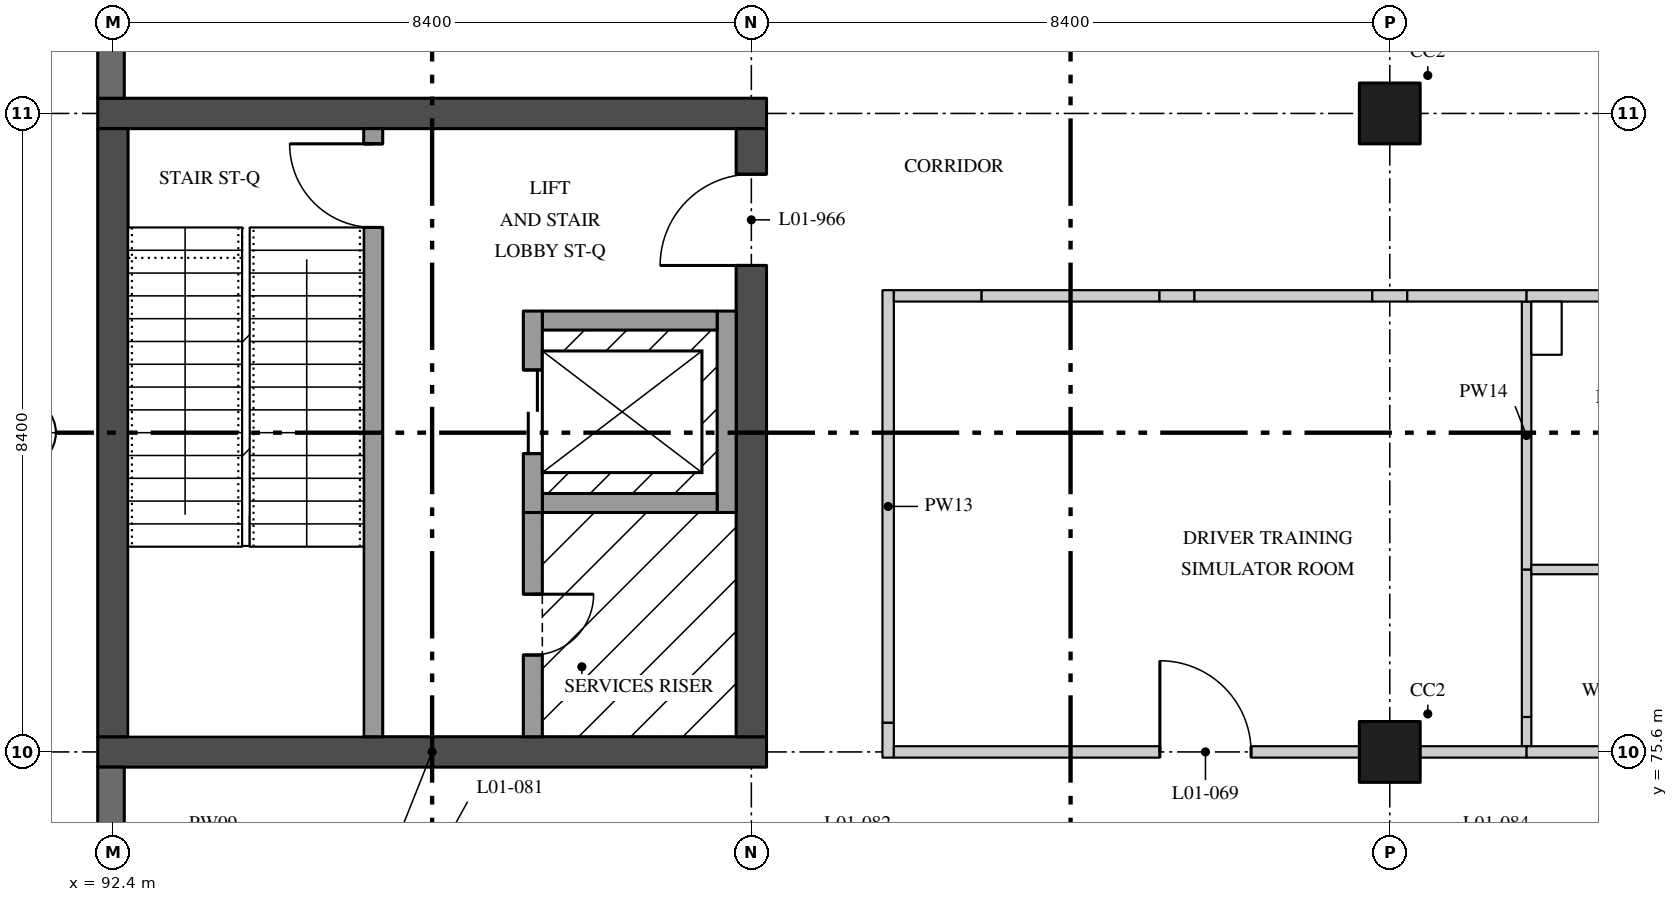
"""IFC4 building model, lengths in metres.
Left out: names, types, materials, properties, quantities, classifications, styles, units other than length and angle.
Written with IfcOpenShell. Run it as: python <this file> out.ifc"""

import sys

from ifc_helpers import new_model, si_unit, direction, frame, frame_2d, origin, origin_2d, place, context, subcontext, project, spatial, rectangle, extrude, element, fill, save


model = new_model("IFC4")
c1 = context("Model", 3, precision=1e-05, world=origin(), true_north=direction((0.0, 1.0)))
c2 = subcontext(c1, "Body", "Model", "MODEL_VIEW")
j1 = project(units=[si_unit("LENGTHUNIT", "METRE"), si_unit("PLANEANGLEUNIT", "RADIAN")], contexts=[c1])
p1 = place(None, origin())
s1 = spatial("IfcSite", under=j1, at=p1, CompositionType="ELEMENT")
p2 = place(p1, origin())
s2 = spatial("IfcBuilding", under=s1, at=p2, CompositionType="ELEMENT")
p3 = place(p2, frame((0.0, 0.0, 5.4)))
s3 = spatial("IfcBuildingStorey", under=s2, at=p3, CompositionType="ELEMENT", Elevation=5.4)
for number, where, z_axis, x_axis in (
    (1, (109.2, 75.6, 0.0), (0.0, 0.0, 1.0), (1.0, 0.0, 0.0)),
    (2, (109.2, 84.0, 0.0), (0.0, 0.0, 1.0), (1.0, 0.0, 0.0)),
):
    element("IfcColumn", number, at=place(p3, frame(where, z_axis=z_axis, x_axis=x_axis)), inside=s3, PredefinedType="COLUMN", context=c2, shape_type="SweptSolid", body=[
        extrude(rectangle(XDim=0.8, YDim=0.8, at=origin_2d()), origin(), (0.0, 0.0, 1.0), 4.37),
    ])
for number, where, z_axis, x_axis in (
    (3, (92.2, 75.6, 0.0), (0.0, 0.0, 1.0), (1.0, 0.0, 0.0)),
    (4, (92.2, 84.0, 0.0), (0.0, 0.0, 1.0), (1.0, 0.0, 0.0)),
):
    element("IfcWall", number, at=place(p3, frame(where, z_axis=z_axis, x_axis=x_axis)), inside=s3, PredefinedType="SHEAR", context=c2, shape_type="SweptSolid", body=[
        extrude(rectangle(XDim=8.8, YDim=0.4, at=frame_2d((4.4, 0.0))), origin(), (0.0, 0.0, 1.0), 4.37),
    ])
p4 = place(p3, frame((92.4, 75.8, 0.0), z_axis=(0.0, 0.0, 1.0), x_axis=(0.0, 1.0, 0.0)))
e5 = element("IfcWall", 5, at=p4, inside=s3, PredefinedType="SHEAR", context=c2, shape_type="SweptSolid", body=[
    extrude(rectangle(XDim=8.0, YDim=0.4, at=frame_2d((4.0, 0.0))), origin(), (0.0, 0.0, 1.0), 4.37),
])
p5 = place(p3, frame((100.8, 75.8, 0.0), z_axis=(0.0, 0.0, 1.0), x_axis=(0.0, 1.0, 0.0)))
e6 = element("IfcWall", 6, at=p5, inside=s3, PredefinedType="SHEAR", context=c2, shape_type="SweptSolid", body=[
    extrude(rectangle(XDim=8.0, YDim=0.4, at=frame_2d((4.0, 0.0))), origin(), (0.0, 0.0, 1.0), 4.37),
])
p6 = place(p5, frame((6.2, 0.0, 0.0)))
e7 = element("IfcOpeningElement", 7, at=p6, cuts=e6, PredefinedType="OPENING", context=c2, shape_type="SweptSolid", body=[
    extrude(rectangle(XDim=1.2, YDim=2.1, at=frame_2d((0.6, 1.05))), frame((0.0, 0.21, 0.0), z_axis=(0.0, -1.0, 0.0), x_axis=(1.0, 0.0, 0.0)), (0.0, 0.0, 1.0), 0.42),
])
p7 = place(p3, frame((95.825, 83.8, 0.0), z_axis=(0.0, 0.0, 1.0), x_axis=(0.0, -1.0, 0.0)))
e8 = element("IfcWall", 8, at=p7, inside=s3, PredefinedType="SOLIDWALL", context=c2, shape_type="SweptSolid", body=[
    extrude(rectangle(XDim=8.0, YDim=0.25, at=frame_2d((4.0, 0.0))), origin(), (0.0, 0.0, 1.0), 4.37),
])
p8 = place(p7, frame((0.2, 0.0, 0.0)))
e9 = element("IfcOpeningElement", 9, at=p8, cuts=e8, PredefinedType="OPENING", context=c2, shape_type="SweptSolid", body=[
    extrude(rectangle(XDim=1.1, YDim=2.1, at=frame_2d((0.55, 1.05))), frame((0.0, 0.135, 0.0), z_axis=(0.0, -1.0, 0.0), x_axis=(1.0, 0.0, 0.0)), (0.0, 0.0, 1.0), 0.27),
])
p9 = place(p3, frame((97.925, 78.75, 0.0), z_axis=(0.0, 0.0, 1.0), x_axis=(0.0, -1.0, 0.0)))
e10 = element("IfcWall", 10, at=p9, inside=s3, PredefinedType="SOLIDWALL", context=c2, shape_type="SweptSolid", body=[
    extrude(rectangle(XDim=2.95, YDim=0.25, at=frame_2d((1.475, 0.0))), origin(), (0.0, 0.0, 1.0), 4.37),
])
p10 = place(p9, frame((1.075, 0.0, 0.0)))
e11 = element("IfcOpeningElement", 11, at=p10, cuts=e10, PredefinedType="OPENING", context=c2, shape_type="SweptSolid", body=[
    extrude(rectangle(XDim=0.8, YDim=2.1, at=frame_2d((0.4, 1.05))), frame((0.0, 0.135, 0.0), z_axis=(0.0, -1.0, 0.0), x_axis=(1.0, 0.0, 0.0)), (0.0, 0.0, 1.0), 0.27),
])
p11 = place(p3, frame((100.475, 78.75, 0.0), z_axis=(0.0, 0.0, 1.0), x_axis=(0.0, 1.0, 0.0)))
e12 = element("IfcWall", 12, at=p11, inside=s3, PredefinedType="SOLIDWALL", context=c2, shape_type="SweptSolid", body=[
    extrude(rectangle(XDim=2.65, YDim=0.25, at=frame_2d((1.325, 0.0))), origin(), (0.0, 0.0, 1.0), 4.37),
])
for number, where, z_axis, x_axis in (
    (13, (98.05, 81.275, 0.0), (0.0, 0.0, 1.0), (1.0, 0.0, 0.0)),
    (14, (98.05, 78.875, 0.0), (0.0, 0.0, 1.0), (1.0, 0.0, 0.0)),
):
    element("IfcWall", number, at=place(p3, frame(where, z_axis=z_axis, x_axis=x_axis)), inside=s3, PredefinedType="SOLIDWALL", context=c2, shape_type="SweptSolid", body=[
        extrude(rectangle(XDim=2.3, YDim=0.25, at=frame_2d((1.15, 0.0))), origin(), (0.0, 0.0, 1.0), 4.37),
    ])
p12 = place(p3, frame((97.925, 78.75, 0.0), z_axis=(0.0, 0.0, 1.0), x_axis=(0.0, 1.0, 0.0)))
e15 = element("IfcWall", 15, at=p12, inside=s3, PredefinedType="SOLIDWALL", context=c2, shape_type="SweptSolid", body=[
    extrude(rectangle(XDim=2.65, YDim=0.25, at=frame_2d((1.325, 0.0))), origin(), (0.0, 0.0, 1.0), 4.37),
])
p13 = place(p12, frame((0.775, 0.0, 0.0)))
e16 = element("IfcOpeningElement", 16, at=p13, cuts=e15, PredefinedType="OPENING", context=c2, shape_type="SweptSolid", body=[
    extrude(rectangle(XDim=1.1, YDim=2.1, at=frame_2d((0.55, 1.05))), frame((0.0, 0.135, 0.0), z_axis=(0.0, -1.0, 0.0), x_axis=(1.0, 0.0, 0.0)), (0.0, 0.0, 1.0), 0.27),
])
p14 = place(p3, frame((111.0, 75.675, 0.0), z_axis=(0.0, 0.0, 1.0), x_axis=(0.0, 1.0, 0.0)))
e17 = element("IfcWall", 17, at=p14, inside=s3, PredefinedType="PARTITIONING", context=c2, shape_type="SweptSolid", body=[
    extrude(rectangle(XDim=0.385, YDim=0.125, at=frame_2d((0.192, 0.0))), origin(), (0.0, 0.0, 1.0), 3.746),
])
p15 = place(p3, frame((111.0, 76.06, 0.0), z_axis=(0.0, 0.0, 1.0), x_axis=(0.0, 1.0, 0.0)))
e18 = element("IfcWall", 18, at=p15, inside=s3, PredefinedType="PARTITIONING", context=c2, shape_type="SweptSolid", body=[
    extrude(rectangle(XDim=1.94, YDim=0.125, at=frame_2d((0.97, 0.0))), origin(), (0.0, 0.0, 1.0), 4.37),
])
p16 = place(p3, frame((111.0, 78.0, 0.0), z_axis=(0.0, 0.0, 1.0), x_axis=(0.0, 1.0, 0.0)))
e19 = element("IfcWall", 19, at=p16, inside=s3, PredefinedType="PARTITIONING", context=c2, shape_type="SweptSolid", body=[
    extrude(rectangle(XDim=3.525, YDim=0.125, at=frame_2d((1.762, 0.0))), origin(), (0.0, 0.0, 1.0), 4.37),
])
p17 = place(p3, frame((102.6, 75.525, 0.0), z_axis=(0.0, 0.0, 1.0), x_axis=(0.0, 1.0, 0.0)))
e20 = element("IfcWall", 20, at=p17, inside=s3, PredefinedType="PARTITIONING", context=c2, shape_type="SweptSolid", body=[
    extrude(rectangle(XDim=0.46, YDim=0.15, at=frame_2d((0.23, 0.0))), origin(), (0.0, 0.0, 1.0), 3.746),
])
p18 = place(p3, frame((102.6, 75.985, 0.0), z_axis=(0.0, 0.0, 1.0), x_axis=(0.0, 1.0, 0.0)))
e21 = element("IfcWall", 21, at=p18, inside=s3, PredefinedType="PARTITIONING", context=c2, shape_type="SweptSolid", body=[
    extrude(rectangle(XDim=5.69, YDim=0.15, at=frame_2d((2.845, 0.0))), origin(), (0.0, 0.0, 1.0), 4.37),
])
p19 = place(p3, frame((102.675, 75.6, 0.0), z_axis=(0.0, 0.0, 1.0), x_axis=(1.0, 0.0, 0.0)))
e22 = element("IfcWall", 22, at=p19, inside=s3, PredefinedType="PARTITIONING", context=c2, shape_type="SweptSolid", body=[
    extrude(rectangle(XDim=6.125, YDim=0.15, at=frame_2d((3.062, 0.0))), origin(), (0.0, 0.0, 1.0), 3.746),
])
p20 = place(p19, frame((3.5, 0.0, 0.0)))
e23 = element("IfcOpeningElement", 23, at=p20, cuts=e22, PredefinedType="OPENING", context=c2, shape_type="SweptSolid", body=[
    extrude(rectangle(XDim=1.2, YDim=2.4, at=frame_2d((0.6, 1.2))), frame((0.0, 0.085, 0.0), z_axis=(0.0, -1.0, 0.0), x_axis=(1.0, 0.0, 0.0)), (0.0, 0.0, 1.0), 0.17),
])
p21 = place(p3, frame((109.6, 75.6, 0.0), z_axis=(0.0, 0.0, 1.0), x_axis=(1.0, 0.0, 0.0)))
e24 = element("IfcWall", 24, at=p21, inside=s3, PredefinedType="PARTITIONING", context=c2, shape_type="SweptSolid", body=[
    extrude(rectangle(XDim=1.4, YDim=0.15, at=frame_2d((0.7, 0.0))), origin(), (0.0, 0.0, 1.0), 3.746),
])
p22 = place(p3, frame((102.675, 81.6, 0.0), z_axis=(0.0, 0.0, 1.0), x_axis=(1.0, 0.0, 0.0)))
e25 = element("IfcWall", 25, at=p22, inside=s3, PredefinedType="PARTITIONING", context=c2, shape_type="SweptSolid", body=[
    extrude(rectangle(XDim=1.155, YDim=0.15, at=frame_2d((0.578, 0.0))), origin(), (0.0, 0.0, 1.0), 3.895),
])
p23 = place(p3, frame((103.83, 81.6, 0.0), z_axis=(0.0, 0.0, 1.0), x_axis=(1.0, 0.0, 0.0)))
e26 = element("IfcWall", 26, at=p23, inside=s3, PredefinedType="PARTITIONING", context=c2, shape_type="SweptSolid", body=[
    extrude(rectangle(XDim=2.34, YDim=0.15, at=frame_2d((1.17, 0.0))), origin(), (0.0, 0.0, 1.0), 4.37),
])
p24 = place(p3, frame((106.17, 81.6, 0.0), z_axis=(0.0, 0.0, 1.0), x_axis=(1.0, 0.0, 0.0)))
e27 = element("IfcWall", 27, at=p24, inside=s3, PredefinedType="PARTITIONING", context=c2, shape_type="SweptSolid", body=[
    extrude(rectangle(XDim=0.46, YDim=0.15, at=frame_2d((0.23, 0.0))), origin(), (0.0, 0.0, 1.0), 3.895),
])
p25 = place(p3, frame((106.63, 81.6, 0.0), z_axis=(0.0, 0.0, 1.0), x_axis=(1.0, 0.0, 0.0)))
e28 = element("IfcWall", 28, at=p25, inside=s3, PredefinedType="PARTITIONING", context=c2, shape_type="SweptSolid", body=[
    extrude(rectangle(XDim=2.34, YDim=0.15, at=frame_2d((1.17, 0.0))), origin(), (0.0, 0.0, 1.0), 4.37),
])
p26 = place(p3, frame((108.97, 81.6, 0.0), z_axis=(0.0, 0.0, 1.0), x_axis=(1.0, 0.0, 0.0)))
e29 = element("IfcWall", 29, at=p26, inside=s3, PredefinedType="PARTITIONING", context=c2, shape_type="SweptSolid", body=[
    extrude(rectangle(XDim=0.46, YDim=0.15, at=frame_2d((0.23, 0.0))), origin(), (0.0, 0.0, 1.0), 3.746),
])
p27 = place(p3, frame((109.43, 81.6, 0.0), z_axis=(0.0, 0.0, 1.0), x_axis=(1.0, 0.0, 0.0)))
e30 = element("IfcWall", 30, at=p27, inside=s3, PredefinedType="PARTITIONING", context=c2, shape_type="SweptSolid", body=[
    extrude(rectangle(XDim=1.57, YDim=0.15, at=frame_2d((0.785, 0.0))), origin(), (0.0, 0.0, 1.0), 4.37),
])
p28 = place(p3, frame((111.062, 78.0, 0.0), z_axis=(0.0, 0.0, 1.0), x_axis=(1.0, 0.0, 0.0)))
e31 = element("IfcWall", 31, at=p28, inside=s3, PredefinedType="PARTITIONING", context=c2, shape_type="SweptSolid", body=[
    extrude(rectangle(XDim=1.13, YDim=0.125, at=frame_2d((0.565, 0.0))), origin(), (0.0, 0.0, 1.0), 3.895),
])
p29 = place(p3, frame((111.0, 75.6, 0.0), z_axis=(0.0, 0.0, 1.0), x_axis=(1.0, 0.0, 0.0)))
e32 = element("IfcWall", 32, at=p29, inside=s3, PredefinedType="PARTITIONING", context=c2, shape_type="SweptSolid", body=[
    extrude(rectangle(XDim=6.2, YDim=0.15, at=frame_2d((3.1, 0.0))), origin(), (0.0, 0.0, 1.0), 3.746),
])
p30 = place(p29, frame((2.55, 0.0, 0.0)))
e33 = element("IfcOpeningElement", 33, at=p30, cuts=e32, PredefinedType="OPENING", context=c2, shape_type="SweptSolid", body=[
    extrude(rectangle(XDim=0.9, YDim=2.1, at=frame_2d((0.45, 1.05))), frame((0.0, 0.085, 0.0), z_axis=(0.0, -1.0, 0.0), x_axis=(1.0, 0.0, 0.0)), (0.0, 0.0, 1.0), 0.17),
])
p31 = place(p3, frame((111.0, 81.6, 0.0), z_axis=(0.0, 0.0, 1.0), x_axis=(1.0, 0.0, 0.0)))
e34 = element("IfcWall", 34, at=p31, inside=s3, PredefinedType="PARTITIONING", context=c2, shape_type="SweptSolid", body=[
    extrude(rectangle(XDim=1.23, YDim=0.15, at=frame_2d((0.615, 0.0))), origin(), (0.0, 0.0, 1.0), 3.895),
])
p32 = place(p3, frame((92.375, 92.02, 0.0), z_axis=(0.0, 0.0, 1.0), x_axis=(0.0, -1.0, 0.0)))
e35 = element("IfcWall", 35, at=p32, inside=s3, PredefinedType="SOLIDWALL", context=c2, shape_type="SweptSolid", body=[
    extrude(rectangle(XDim=7.82, YDim=0.35, at=frame_2d((3.91, 0.0))), origin(), (0.0, 0.0, 1.0), 3.746),
])
p33 = place(p32, frame((2.62, 0.0, 1.5)))
e36 = element("IfcOpeningElement", 36, at=p33, cuts=e35, PredefinedType="OPENING", context=c2, shape_type="SweptSolid", body=[
    extrude(rectangle(XDim=0.3, YDim=1.5, at=frame_2d((0.15, 0.75))), frame((0.0, 0.185, 0.0), z_axis=(0.0, -1.0, 0.0), x_axis=(1.0, 0.0, 0.0)), (0.0, 0.0, 1.0), 0.37),
])
p34 = place(p32, frame((4.27, 0.0, 1.5)))
e37 = element("IfcOpeningElement", 37, at=p34, cuts=e35, PredefinedType="OPENING", context=c2, shape_type="SweptSolid", body=[
    extrude(rectangle(XDim=1.2, YDim=1.5, at=frame_2d((0.6, 0.75))), frame((0.0, 0.185, 0.0), z_axis=(0.0, -1.0, 0.0), x_axis=(1.0, 0.0, 0.0)), (0.0, 0.0, 1.0), 0.37),
])
p35 = place(p32, frame((6.82, 0.0, 1.5)))
e38 = element("IfcOpeningElement", 38, at=p35, cuts=e35, PredefinedType="OPENING", context=c2, shape_type="SweptSolid", body=[
    extrude(rectangle(XDim=0.3, YDim=1.5, at=frame_2d((0.15, 0.75))), frame((0.0, 0.185, 0.0), z_axis=(0.0, -1.0, 0.0), x_axis=(1.0, 0.0, 0.0)), (0.0, 0.0, 1.0), 0.37),
])
p36 = place(p3, frame((92.375, 75.4, 0.0), z_axis=(0.0, 0.0, 1.0), x_axis=(0.0, -1.0, 0.0)))
e39 = element("IfcWall", 39, at=p36, inside=s3, PredefinedType="SOLIDWALL", context=c2, shape_type="SweptSolid", body=[
    extrude(rectangle(XDim=8.0, YDim=0.35, at=frame_2d((4.0, 0.0))), origin(), (0.0, 0.0, 1.0), 3.746),
])
p37 = place(p36, frame((2.8, 0.0, 1.5)))
e40 = element("IfcOpeningElement", 40, at=p37, cuts=e39, PredefinedType="OPENING", context=c2, shape_type="SweptSolid", body=[
    extrude(rectangle(XDim=0.3, YDim=1.5, at=frame_2d((0.15, 0.75))), frame((0.0, 0.185, 0.0), z_axis=(0.0, -1.0, 0.0), x_axis=(1.0, 0.0, 0.0)), (0.0, 0.0, 1.0), 0.37),
])
p38 = place(p36, frame((4.45, 0.0, 1.5)))
e41 = element("IfcOpeningElement", 41, at=p38, cuts=e39, PredefinedType="OPENING", context=c2, shape_type="SweptSolid", body=[
    extrude(rectangle(XDim=1.2, YDim=1.5, at=frame_2d((0.6, 0.75))), frame((0.0, 0.185, 0.0), z_axis=(0.0, -1.0, 0.0), x_axis=(1.0, 0.0, 0.0)), (0.0, 0.0, 1.0), 0.37),
])
p39 = place(p36, frame((7.0, 0.0, 1.5)))
e42 = element("IfcOpeningElement", 42, at=p39, cuts=e39, PredefinedType="OPENING", context=c2, shape_type="SweptSolid", body=[
    extrude(rectangle(XDim=0.3, YDim=1.5, at=frame_2d((0.15, 0.75))), frame((0.0, 0.185, 0.0), z_axis=(0.0, -1.0, 0.0), x_axis=(1.0, 0.0, 0.0)), (0.0, 0.0, 1.0), 0.37),
])
p40 = place(p6, origin())
e43 = element("IfcDoor", 43, at=p40, inside=s3, OperationType="SINGLE_SWING_RIGHT", PredefinedType="DOOR", context=c2, shape_type="SweptSolid", body=[
    extrude(rectangle(XDim=1.2, YDim=2.1, at=frame_2d((0.6, 1.05))), frame((0.0, 0.035, 0.0), z_axis=(0.0, -1.0, 0.0), x_axis=(1.0, 0.0, 0.0)), (0.0, 0.0, 1.0), 0.07),
])
fill(e7, e43)
p41 = place(p10, origin())
e44 = element("IfcDoor", 44, at=p41, inside=s3, OperationType="SINGLE_SWING_RIGHT", PredefinedType="DOOR", context=c2, shape_type="SweptSolid", body=[
    extrude(rectangle(XDim=0.8, YDim=2.1, at=frame_2d((0.4, 1.05))), frame((0.0, 0.035, 0.0), z_axis=(0.0, -1.0, 0.0), x_axis=(1.0, 0.0, 0.0)), (0.0, 0.0, 1.0), 0.07),
])
fill(e11, e44)
p42 = place(p8, frame((1.1, 0.0, 0.0), z_axis=(0.0, 0.0, 1.0), x_axis=(-1.0, 0.0, 0.0)))
e45 = element("IfcDoor", 45, at=p42, inside=s3, OperationType="SINGLE_SWING_LEFT", PredefinedType="DOOR", context=c2, shape_type="SweptSolid", body=[
    extrude(rectangle(XDim=1.1, YDim=2.1, at=frame_2d((0.55, 1.05))), frame((0.0, 0.035, 0.0), z_axis=(0.0, -1.0, 0.0), x_axis=(1.0, 0.0, 0.0)), (0.0, 0.0, 1.0), 0.07),
])
fill(e9, e45)
p43 = place(p13, origin())
e46 = element("IfcDoor", 46, at=p43, inside=s3, OperationType="DOUBLE_DOOR_SLIDING", PredefinedType="DOOR", context=c2, shape_type="SweptSolid", body=[
    extrude(rectangle(XDim=1.1, YDim=2.1, at=frame_2d((0.55, 1.05))), frame((0.0, 0.04, 0.0), z_axis=(0.0, -1.0, 0.0), x_axis=(1.0, 0.0, 0.0)), (0.0, 0.0, 1.0), 0.08),
])
fill(e16, e46)
p44 = place(p20, origin())
e47 = element("IfcDoor", 47, at=p44, inside=s3, OperationType="SINGLE_SWING_RIGHT", PredefinedType="DOOR", context=c2, shape_type="SweptSolid", body=[
    extrude(rectangle(XDim=1.2, YDim=2.4, at=frame_2d((0.6, 1.2))), frame((0.0, 0.025, 0.0), z_axis=(0.0, -1.0, 0.0), x_axis=(1.0, 0.0, 0.0)), (0.0, 0.0, 1.0), 0.05),
])
fill(e23, e47)
save(model, sys.argv[1])
